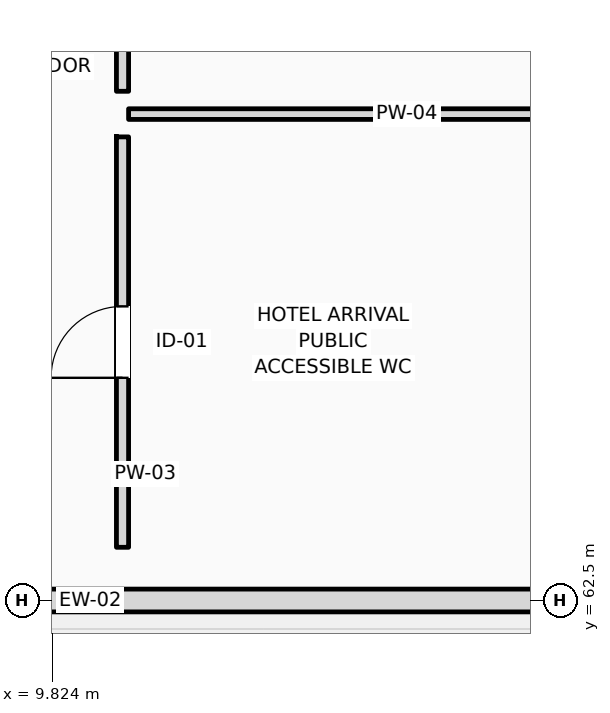
"""IFC4 building model, lengths in metres.
Left out: names, types, materials, properties, quantities, classifications, styles, units other than length and angle.
Written with IfcOpenShell. Run it as: python <this file> out.ifc"""

import sys

from ifc_helpers import new_model, si_unit, direction, frame, frame_2d, origin, place, context, subcontext, project, spatial, rectangle, extrude, element, fill, save


model = new_model("IFC4")
c1 = context("Model", 3, precision=1e-05, world=origin(), true_north=direction((0.0, 1.0)))
c2 = subcontext(c1, "Body", "Model", "MODEL_VIEW")
j1 = project(units=[si_unit("LENGTHUNIT", "METRE"), si_unit("PLANEANGLEUNIT", "RADIAN")], contexts=[c1])
p1 = place(None, origin())
s1 = spatial("IfcSite", under=j1, at=p1, CompositionType="ELEMENT")
p2 = place(p1, origin())
s2 = spatial("IfcBuilding", under=s1, at=p2, CompositionType="ELEMENT")
p3 = place(p2, origin())
s3 = spatial("IfcBuildingStorey", under=s2, at=p3, CompositionType="ELEMENT", Elevation=0.0)
p4 = place(p3, frame((0.0, 62.5, 0.0), z_axis=(0.0, 0.0, 1.0), x_axis=(1.0, 0.0, 0.0)))
e1 = element("IfcWall", 1, at=p4, inside=s3, PredefinedType="STANDARD", context=c2, shape_type="SweptSolid", body=[
    extrude(rectangle(XDim=25.2, YDim=0.3, at=frame_2d((12.6, 0.0))), origin(), (0.0, 0.0, 1.0), 5.14),
])
p5 = place(p4, frame((20.35, 0.0, 0.0)))
e2 = element("IfcOpeningElement", 2, at=p5, cuts=e1, PredefinedType="OPENING", context=c2, shape_type="SweptSolid", body=[
    extrude(rectangle(XDim=2.1, YDim=2.4, at=frame_2d((1.05, 1.2))), frame((0.0, 0.16, 0.0), z_axis=(0.0, -1.0, 0.0), x_axis=(1.0, 0.0, 0.0)), (0.0, 0.0, 1.0), 0.32),
])
p6 = place(p3, frame((10.75, 63.2, 0.0), z_axis=(0.0, 0.0, 1.0), x_axis=(0.0, 1.0, 0.0)))
e3 = element("IfcWall", 3, at=p6, inside=s3, PredefinedType="PARTITIONING", context=c2, shape_type="SweptSolid", body=[
    extrude(rectangle(XDim=5.4, YDim=0.16, at=frame_2d((2.7, 0.0))), origin(), (0.0, 0.0, 1.0), 5.7),
])
p7 = place(p6, frame((2.23, 0.0, 0.0)))
e4 = element("IfcOpeningElement", 4, at=p7, cuts=e3, PredefinedType="OPENING", context=c2, shape_type="SweptSolid", body=[
    extrude(rectangle(XDim=0.94, YDim=2.15, at=frame_2d((0.47, 1.075))), frame((0.0, 0.09, 0.0), z_axis=(0.0, -1.0, 0.0), x_axis=(1.0, 0.0, 0.0)), (0.0, 0.0, 1.0), 0.18),
])
p8 = place(p3, frame((10.75, 69.2, 0.0), z_axis=(0.0, 0.0, 1.0), x_axis=(0.0, 1.0, 0.0)))
e5 = element("IfcWall", 5, at=p8, inside=s3, PredefinedType="PARTITIONING", context=c2, shape_type="SweptSolid", body=[
    extrude(rectangle(XDim=9.2, YDim=0.16, at=frame_2d((4.6, 0.0))), origin(), (0.0, 0.0, 1.0), 5.7),
])
p9 = place(p8, frame((4.15, 0.0, 0.0)))
e6 = element("IfcOpeningElement", 6, at=p9, cuts=e5, PredefinedType="OPENING", context=c2, shape_type="SweptSolid", body=[
    extrude(rectangle(XDim=0.9, YDim=2.1, at=frame_2d((0.45, 1.05))), frame((0.0, 0.09, 0.0), z_axis=(0.0, -1.0, 0.0), x_axis=(1.0, 0.0, 0.0)), (0.0, 0.0, 1.0), 0.18),
])
p10 = place(p3, frame((10.83, 68.9, 0.0), z_axis=(0.0, 0.0, 1.0), x_axis=(1.0, 0.0, 0.0)))
e7 = element("IfcWall", 7, at=p10, inside=s3, PredefinedType="PARTITIONING", context=c2, shape_type="SweptSolid", body=[
    extrude(rectangle(XDim=6.72, YDim=0.14, at=frame_2d((3.36, 0.0))), origin(), (0.0, 0.0, 1.0), 5.7),
])
p11 = place(p7, origin())
e8 = element("IfcDoor", 8, at=p11, inside=s3, OperationType="SINGLE_SWING_LEFT", PredefinedType="DOOR", context=c2, shape_type="SweptSolid", body=[
    extrude(rectangle(XDim=0.94, YDim=2.15, at=frame_2d((0.47, 1.075))), frame((0.0, 0.025, 0.0), z_axis=(0.0, -1.0, 0.0), x_axis=(1.0, 0.0, 0.0)), (0.0, 0.0, 1.0), 0.05),
])
fill(e4, e8)
save(model, sys.argv[1])
